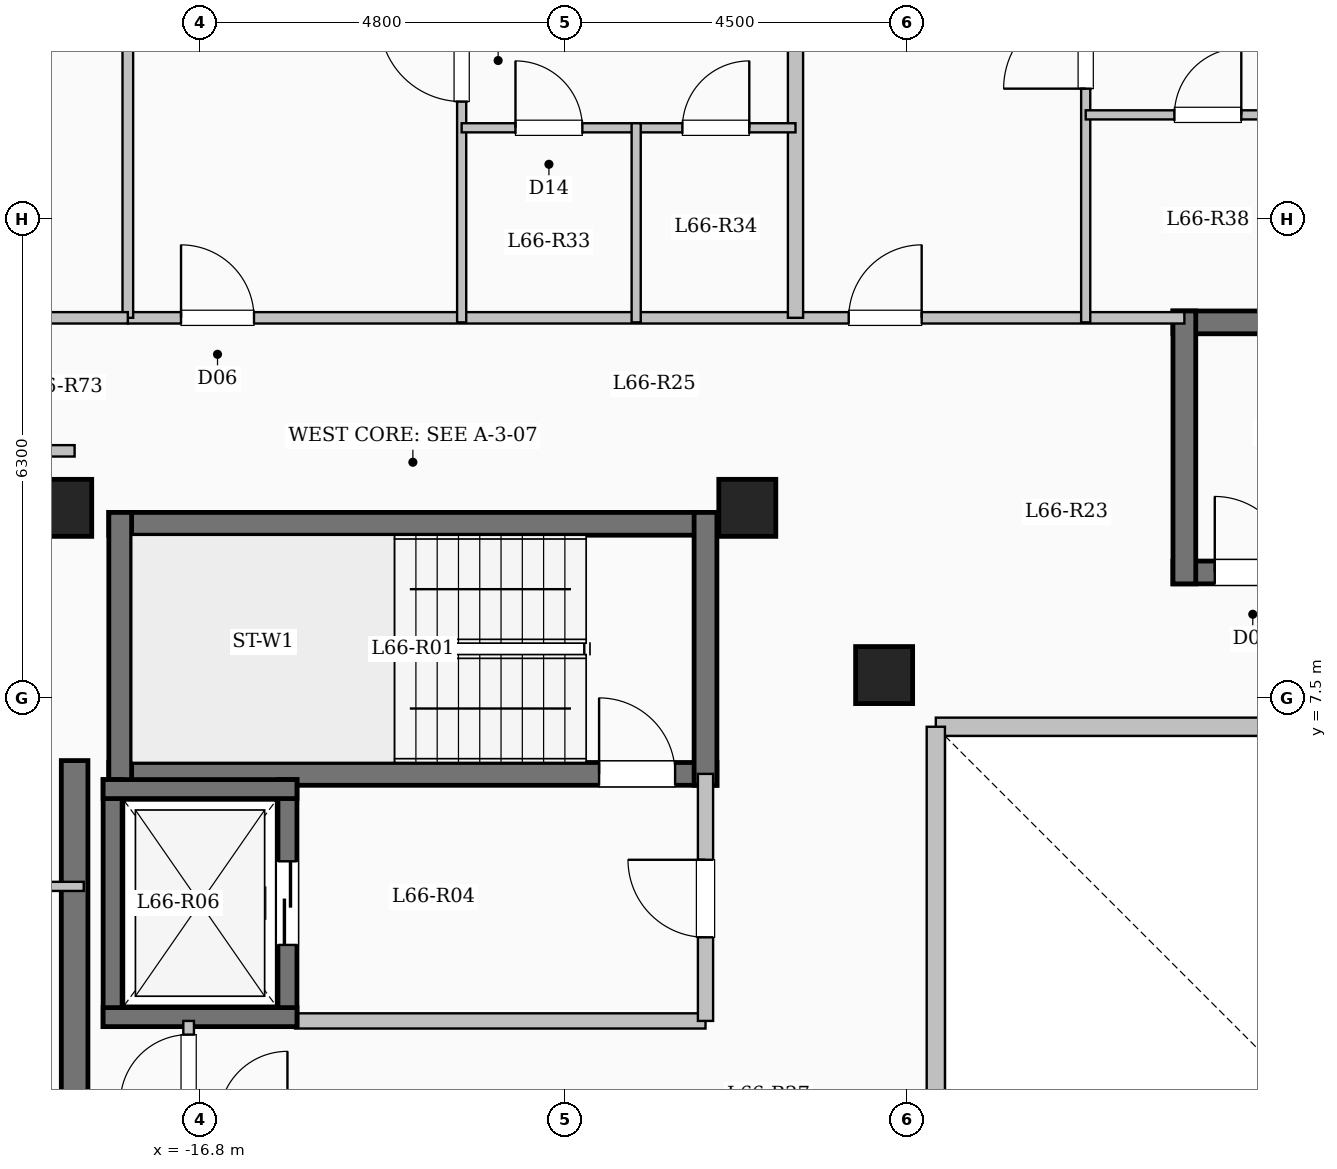
"""IFC4 building model, lengths in metres.
Left out: names, types, materials, properties, quantities, classifications, styles, units other than length and angle.
Written with IfcOpenShell. Run it as: python <this file> out.ifc"""

import sys

from ifc_helpers import new_model, si_unit, direction, frame, frame_2d, origin, origin_2d, place, context, subcontext, project, spatial, rectangle, extrude, element, fill, save


model = new_model("IFC4")
c1 = context("Model", 3, precision=1e-05, world=origin(), true_north=direction((0.0, 1.0)))
c2 = subcontext(c1, "Body", "Model", "MODEL_VIEW")
j1 = project(units=[si_unit("LENGTHUNIT", "METRE"), si_unit("PLANEANGLEUNIT", "RADIAN")], contexts=[c1])
p1 = place(None, origin())
s1 = spatial("IfcSite", under=j1, at=p1, CompositionType="ELEMENT")
p2 = place(p1, origin())
s2 = spatial("IfcBuilding", under=s1, at=p2, CompositionType="ELEMENT")
p3 = place(p2, frame((0.0, 0.0, 244.85)))
s3 = spatial("IfcBuildingStorey", under=s2, at=p3, CompositionType="ELEMENT", Elevation=244.85)
for number, where, z_axis, x_axis in (
    (1, (-7.8, 7.8, 0.0), (0.0, 0.0, 1.0), (1.0, 0.0, 0.0)),
    (2, (-9.6, 10.0, 0.0), (0.0, 0.0, 1.0), (1.0, 0.0, 0.0)),
    (3, (-18.6, 10.0, 0.0), (0.0, 0.0, 1.0), (1.0, 0.0, 0.0)),
):
    element("IfcColumn", number, at=place(p3, frame(where, z_axis=z_axis, x_axis=x_axis)), inside=s3, PredefinedType="COLUMN", context=c2, shape_type="SweptSolid", body=[
        extrude(rectangle(XDim=0.75, YDim=0.75, at=origin_2d()), origin(), (0.0, 0.0, 1.0), 3.35),
    ])
p4 = place(p3, frame((7.12, 7.12, 0.0), z_axis=(0.0, 0.0, 1.0), x_axis=(-1.0, 0.0, 0.0)))
e4 = element("IfcWall", 4, at=p4, inside=s3, PredefinedType="SOLIDWALL", context=c2, shape_type="SweptSolid", body=[
    extrude(rectangle(XDim=14.24, YDim=0.24, at=frame_2d((7.12, 0.0))), origin(), (0.0, 0.0, 1.0), 3.1),
])
p5 = place(p4, frame((6.42, 0.0, 0.95)))
e5 = element("IfcOpeningElement", 5, at=p5, cuts=e4, PredefinedType="OPENING", context=c2, shape_type="SweptSolid", body=[
    extrude(rectangle(XDim=1.4, YDim=1.5, at=frame_2d((0.7, 0.75))), frame((0.0, 0.13, 0.0), z_axis=(0.0, -1.0, 0.0), x_axis=(1.0, 0.0, 0.0)), (0.0, 0.0, 1.0), 0.26),
])
p6 = place(p3, frame((-7.12, 7.12, 0.0), z_axis=(0.0, 0.0, 1.0), x_axis=(0.0, -1.0, 0.0)))
e6 = element("IfcWall", 6, at=p6, inside=s3, PredefinedType="SOLIDWALL", context=c2, shape_type="SweptSolid", body=[
    extrude(rectangle(XDim=14.24, YDim=0.24, at=frame_2d((7.12, 0.0))), origin(), (0.0, 0.0, 1.0), 3.1),
])
p7 = place(p6, frame((6.42, 0.0, 0.95)))
e7 = element("IfcOpeningElement", 7, at=p7, cuts=e6, PredefinedType="OPENING", context=c2, shape_type="SweptSolid", body=[
    extrude(rectangle(XDim=1.4, YDim=1.5, at=frame_2d((0.7, 0.75))), frame((0.0, 0.13, 0.0), z_axis=(0.0, -1.0, 0.0), x_axis=(1.0, 0.0, 0.0)), (0.0, 0.0, 1.0), 0.26),
])
p8 = place(p3, frame((-18.0, 9.79, 0.0), z_axis=(0.0, 0.0, 1.0), x_axis=(1.0, 0.0, 0.0)))
e8 = element("IfcWall", 8, at=p8, inside=s3, PredefinedType="SHEAR", context=c2, shape_type="SweptSolid", body=[
    extrude(rectangle(XDim=8.0, YDim=0.3, at=frame_2d((4.0, 0.0))), origin(), (0.0, 0.0, 1.0), 3.35),
])
p9 = place(p3, frame((-18.0, 6.5, 0.0), z_axis=(0.0, 0.0, 1.0), x_axis=(1.0, 0.0, 0.0)))
e9 = element("IfcWall", 9, at=p9, inside=s3, PredefinedType="SHEAR", context=c2, shape_type="SweptSolid", body=[
    extrude(rectangle(XDim=8.0, YDim=0.3, at=frame_2d((4.0, 0.0))), origin(), (0.0, 0.0, 1.0), 3.35),
])
p10 = place(p9, frame((6.45, 0.0, 0.0)))
e10 = element("IfcOpeningElement", 10, at=p10, cuts=e9, PredefinedType="OPENING", context=c2, shape_type="SweptSolid", body=[
    extrude(rectangle(XDim=1.0, YDim=2.15, at=frame_2d((0.5, 1.075))), frame((0.0, 0.16, 0.0), z_axis=(0.0, -1.0, 0.0), x_axis=(1.0, 0.0, 0.0)), (0.0, 0.0, 1.0), 0.32),
])
for number, where, z_axis, x_axis in (
    (11, (-17.85, 6.35, 0.0), (0.0, 0.0, 1.0), (0.0, 1.0, 0.0)),
    (12, (-10.15, 6.35, 0.0), (0.0, 0.0, 1.0), (0.0, 1.0, 0.0)),
):
    element("IfcWall", number, at=place(p3, frame(where, z_axis=z_axis, x_axis=x_axis)), inside=s3, PredefinedType="SHEAR", context=c2, shape_type="SweptSolid", body=[
        extrude(rectangle(XDim=3.59, YDim=0.3, at=frame_2d((1.795, 0.0))), origin(), (0.0, 0.0, 1.0), 3.35),
    ])
p11 = place(p3, frame((-4.0, 12.44, 0.0), z_axis=(0.0, 0.0, 1.0), x_axis=(1.0, 0.0, 0.0)))
e13 = element("IfcWall", 13, at=p11, inside=s3, PredefinedType="SHEAR", context=c2, shape_type="SweptSolid", body=[
    extrude(rectangle(XDim=8.0, YDim=0.3, at=frame_2d((4.0, 0.0))), origin(), (0.0, 0.0, 1.0), 3.35),
])
p12 = place(p3, frame((-4.0, 9.15, 0.0), z_axis=(0.0, 0.0, 1.0), x_axis=(1.0, 0.0, 0.0)))
e14 = element("IfcWall", 14, at=p12, inside=s3, PredefinedType="SHEAR", context=c2, shape_type="SweptSolid", body=[
    extrude(rectangle(XDim=8.0, YDim=0.3, at=frame_2d((4.0, 0.0))), origin(), (0.0, 0.0, 1.0), 3.35),
])
p13 = place(p12, frame((0.55, 0.0, 0.0)))
e15 = element("IfcOpeningElement", 15, at=p13, cuts=e14, PredefinedType="OPENING", context=c2, shape_type="SweptSolid", body=[
    extrude(rectangle(XDim=1.0, YDim=2.15, at=frame_2d((0.5, 1.075))), frame((0.0, 0.16, 0.0), z_axis=(0.0, -1.0, 0.0), x_axis=(1.0, 0.0, 0.0)), (0.0, 0.0, 1.0), 0.32),
])
p14 = place(p3, frame((-3.85, 9.0, 0.0), z_axis=(0.0, 0.0, 1.0), x_axis=(0.0, 1.0, 0.0)))
e16 = element("IfcWall", 16, at=p14, inside=s3, PredefinedType="SHEAR", context=c2, shape_type="SweptSolid", body=[
    extrude(rectangle(XDim=3.59, YDim=0.3, at=frame_2d((1.795, 0.0))), origin(), (0.0, 0.0, 1.0), 3.35),
])
p15 = place(p3, frame((-15.55, 3.25, 0.0), z_axis=(0.0, 0.0, 1.0), x_axis=(1.0, 0.0, 0.0)))
e17 = element("IfcWall", 17, at=p15, inside=s3, PredefinedType="SOLIDWALL", context=c2, shape_type="SweptSolid", body=[
    extrude(rectangle(XDim=5.4, YDim=0.2, at=frame_2d((2.7, 0.0))), origin(), (0.0, 0.0, 1.0), 3.1),
])
p16 = place(p3, frame((-10.15, 3.25, 0.0), z_axis=(0.0, 0.0, 1.0), x_axis=(0.0, 1.0, 0.0)))
e18 = element("IfcWall", 18, at=p16, inside=s3, PredefinedType="SOLIDWALL", context=c2, shape_type="SweptSolid", body=[
    extrude(rectangle(XDim=3.25, YDim=0.2, at=frame_2d((1.625, 0.0))), origin(), (0.0, 0.0, 1.0), 3.1),
])
p17 = place(p16, frame((1.1, 0.0, 0.0)))
e19 = element("IfcOpeningElement", 19, at=p17, cuts=e18, PredefinedType="OPENING", context=c2, shape_type="SweptSolid", body=[
    extrude(rectangle(XDim=1.02, YDim=2.15, at=frame_2d((0.51, 1.075))), frame((0.0, 0.11, 0.0), z_axis=(0.0, -1.0, 0.0), x_axis=(1.0, 0.0, 0.0)), (0.0, 0.0, 1.0), 0.22),
])
p18 = place(p3, frame((-17.95, 3.175, 0.0), z_axis=(0.0, 0.0, 1.0), x_axis=(0.0, 1.0, 0.0)))
e20 = element("IfcWall", 20, at=p18, inside=s3, PredefinedType="SHEAR", context=c2, shape_type="SweptSolid", body=[
    extrude(rectangle(XDim=3.25, YDim=0.25, at=frame_2d((1.625, 0.0))), origin(), (0.0, 0.0, 1.0), 3.35),
])
p19 = place(p3, frame((-15.65, 3.175, 0.0), z_axis=(0.0, 0.0, 1.0), x_axis=(0.0, 1.0, 0.0)))
e21 = element("IfcWall", 21, at=p19, inside=s3, PredefinedType="SHEAR", context=c2, shape_type="SweptSolid", body=[
    extrude(rectangle(XDim=3.25, YDim=0.25, at=frame_2d((1.625, 0.0))), origin(), (0.0, 0.0, 1.0), 3.35),
])
p20 = place(p19, frame((1.075, 0.0, 0.0)))
e22 = element("IfcOpeningElement", 22, at=p20, cuts=e21, PredefinedType="OPENING", context=c2, shape_type="SweptSolid", body=[
    extrude(rectangle(XDim=1.1, YDim=2.15, at=frame_2d((0.55, 1.075))), frame((0.0, 0.135, 0.0), z_axis=(0.0, -1.0, 0.0), x_axis=(1.0, 0.0, 0.0)), (0.0, 0.0, 1.0), 0.27),
])
for number, where, z_axis, x_axis in (
    (23, (-18.075, 3.3, 0.0), (0.0, 0.0, 1.0), (1.0, 0.0, 0.0)),
    (24, (-18.075, 6.3, 0.0), (0.0, 0.0, 1.0), (1.0, 0.0, 0.0)),
):
    element("IfcWall", number, at=place(p3, frame(where, z_axis=z_axis, x_axis=x_axis)), inside=s3, PredefinedType="SHEAR", context=c2, shape_type="SweptSolid", body=[
        extrude(rectangle(XDim=2.55, YDim=0.25, at=frame_2d((1.275, 0.0))), origin(), (0.0, 0.0, 1.0), 3.35),
    ])
p21 = place(p3, frame((-18.45, -7.375, 0.0), z_axis=(0.0, 0.0, 1.0), x_axis=(0.0, 1.0, 0.0)))
e25 = element("IfcWall", 25, at=p21, inside=s3, PredefinedType="SHEAR", context=c2, shape_type="SweptSolid", body=[
    extrude(rectangle(XDim=14.05, YDim=0.35, at=frame_2d((7.025, 0.0))), origin(), (0.0, 0.0, 1.0), 3.35),
])
p22 = place(p3, frame((-16.95, 1.95, 0.0), z_axis=(0.0, 0.0, 1.0), x_axis=(0.0, 1.0, 0.0)))
e26 = element("IfcWall", 26, at=p22, inside=s3, PredefinedType="PARTITIONING", context=c2, shape_type="SweptSolid", body=[
    extrude(rectangle(XDim=1.3, YDim=0.14, at=frame_2d((0.65, 0.0))), origin(), (0.0, 0.0, 1.0), 3.1),
])
p23 = place(p22, frame((0.22, 0.0, 0.0)))
e27 = element("IfcOpeningElement", 27, at=p23, cuts=e26, PredefinedType="OPENING", context=c2, shape_type="SweptSolid", body=[
    extrude(rectangle(XDim=0.9, YDim=2.08, at=frame_2d((0.45, 1.04))), frame((0.0, 0.08, 0.0), z_axis=(0.0, -1.0, 0.0), x_axis=(1.0, 0.0, 0.0)), (0.0, 0.0, 1.0), 0.16),
])
p24 = place(p3, frame((-17.75, 12.5, 0.0), z_axis=(0.0, 0.0, 1.0), x_axis=(1.0, 0.0, 0.0)))
e28 = element("IfcWall", 28, at=p24, inside=s3, PredefinedType="PARTITIONING", context=c2, shape_type="SweptSolid", body=[
    extrude(rectangle(XDim=13.9, YDim=0.15, at=frame_2d((6.95, 0.0))), origin(), (0.0, 0.0, 1.0), 3.1),
])
p25 = place(p24, frame((0.7, 0.0, 0.0)))
e29 = element("IfcOpeningElement", 29, at=p25, cuts=e28, PredefinedType="OPENING", context=c2, shape_type="SweptSolid", body=[
    extrude(rectangle(XDim=0.96, YDim=2.15, at=frame_2d((0.48, 1.075))), frame((0.0, 0.085, 0.0), z_axis=(0.0, -1.0, 0.0), x_axis=(1.0, 0.0, 0.0)), (0.0, 0.0, 1.0), 0.17),
])
p26 = place(p24, frame((9.484, 0.0, 0.0)))
e30 = element("IfcOpeningElement", 30, at=p26, cuts=e28, PredefinedType="OPENING", context=c2, shape_type="SweptSolid", body=[
    extrude(rectangle(XDim=0.96, YDim=2.15, at=frame_2d((0.48, 1.075))), frame((0.0, 0.085, 0.0), z_axis=(0.0, -1.0, 0.0), x_axis=(1.0, 0.0, 0.0)), (0.0, 0.0, 1.0), 0.17),
])
p27 = place(p3, frame((-8.966, 12.5, 0.0), z_axis=(0.0, 0.0, 1.0), x_axis=(0.0, 1.0, 0.0)))
e31 = element("IfcWall", 31, at=p27, inside=s3, PredefinedType="SOLIDWALL", context=c2, shape_type="SweptSolid", body=[
    extrude(rectangle(XDim=8.902, YDim=0.2, at=frame_2d((4.451, 0.0))), origin(), (0.0, 0.0, 1.0), 3.1),
])
p28 = place(p3, frame((-13.358, 12.44, 0.0), z_axis=(0.0, 0.0, 1.0), x_axis=(0.0, 1.0, 0.0)))
e32 = element("IfcWall", 32, at=p28, inside=s3, PredefinedType="PARTITIONING", context=c2, shape_type="SweptSolid", body=[
    extrude(rectangle(XDim=8.46, YDim=0.12, at=frame_2d((4.23, 0.0))), origin(), (0.0, 0.0, 1.0), 3.1),
])
p29 = place(p28, frame((2.905, 0.0, 0.0)))
e33 = element("IfcOpeningElement", 33, at=p29, cuts=e32, PredefinedType="OPENING", context=c2, shape_type="SweptSolid", body=[
    extrude(rectangle(XDim=1.08, YDim=2.15, at=frame_2d((0.54, 1.075))), frame((0.0, 0.07, 0.0), z_axis=(0.0, -1.0, 0.0), x_axis=(1.0, 0.0, 0.0)), (0.0, 0.0, 1.0), 0.14),
])
p30 = place(p3, frame((-13.358, 15.0, 0.0), z_axis=(0.0, 0.0, 1.0), x_axis=(1.0, 0.0, 0.0)))
e34 = element("IfcWall", 34, at=p30, inside=s3, PredefinedType="PARTITIONING", context=c2, shape_type="SweptSolid", body=[
    extrude(rectangle(XDim=2.296, YDim=0.12, at=frame_2d((1.148, 0.0))), origin(), (0.0, 0.0, 1.0), 3.1),
])
p31 = place(p30, frame((0.708, 0.0, 0.0)))
e35 = element("IfcOpeningElement", 35, at=p31, cuts=e34, PredefinedType="OPENING", context=c2, shape_type="SweptSolid", body=[
    extrude(rectangle(XDim=0.88, YDim=2.1, at=frame_2d((0.44, 1.05))), frame((0.0, 0.07, 0.0), z_axis=(0.0, -1.0, 0.0), x_axis=(1.0, 0.0, 0.0)), (0.0, 0.0, 1.0), 0.14),
])
p32 = place(p3, frame((-11.062, 15.0, 0.0), z_axis=(0.0, 0.0, 1.0), x_axis=(1.0, 0.0, 0.0)))
e36 = element("IfcWall", 36, at=p32, inside=s3, PredefinedType="PARTITIONING", context=c2, shape_type="SweptSolid", body=[
    extrude(rectangle(XDim=2.096, YDim=0.12, at=frame_2d((1.048, 0.0))), origin(), (0.0, 0.0, 1.0), 3.1),
])
p33 = place(p32, frame((0.608, 0.0, 0.0)))
e37 = element("IfcOpeningElement", 37, at=p33, cuts=e36, PredefinedType="OPENING", context=c2, shape_type="SweptSolid", body=[
    extrude(rectangle(XDim=0.88, YDim=2.1, at=frame_2d((0.44, 1.05))), frame((0.0, 0.07, 0.0), z_axis=(0.0, -1.0, 0.0), x_axis=(1.0, 0.0, 0.0)), (0.0, 0.0, 1.0), 0.14),
])
p34 = place(p3, frame((-11.062, 12.44, 0.0), z_axis=(0.0, 0.0, 1.0), x_axis=(0.0, 1.0, 0.0)))
e38 = element("IfcWall", 38, at=p34, inside=s3, PredefinedType="PARTITIONING", context=c2, shape_type="SweptSolid", body=[
    extrude(rectangle(XDim=2.62, YDim=0.12, at=frame_2d((1.31, 0.0))), origin(), (0.0, 0.0, 1.0), 3.1),
])
p35 = place(p3, frame((-5.148, 12.44, 0.0), z_axis=(0.0, 0.0, 1.0), x_axis=(0.0, 1.0, 0.0)))
e39 = element("IfcWall", 39, at=p35, inside=s3, PredefinedType="PARTITIONING", context=c2, shape_type="SweptSolid", body=[
    extrude(rectangle(XDim=9.903, YDim=0.12, at=frame_2d((4.952, 0.0))), origin(), (0.0, 0.0, 1.0), 3.1),
])
p36 = place(p35, frame((3.075, 0.0, 0.0)))
e40 = element("IfcOpeningElement", 40, at=p36, cuts=e39, PredefinedType="OPENING", context=c2, shape_type="SweptSolid", body=[
    extrude(rectangle(XDim=1.08, YDim=2.15, at=frame_2d((0.54, 1.075))), frame((0.0, 0.07, 0.0), z_axis=(0.0, -1.0, 0.0), x_axis=(1.0, 0.0, 0.0)), (0.0, 0.0, 1.0), 0.14),
])
p37 = place(p3, frame((-5.148, 15.17, 0.0), z_axis=(0.0, 0.0, 1.0), x_axis=(1.0, 0.0, 0.0)))
e41 = element("IfcWall", 41, at=p37, inside=s3, PredefinedType="PARTITIONING", context=c2, shape_type="SweptSolid", body=[
    extrude(rectangle(XDim=3.214, YDim=0.12, at=frame_2d((1.607, 0.0))), origin(), (0.0, 0.0, 1.0), 3.1),
])
p38 = place(p37, frame((1.167, 0.0, 0.0)))
e42 = element("IfcOpeningElement", 42, at=p38, cuts=e41, PredefinedType="OPENING", context=c2, shape_type="SweptSolid", body=[
    extrude(rectangle(XDim=0.88, YDim=2.1, at=frame_2d((0.44, 1.05))), frame((0.0, 0.07, 0.0), z_axis=(0.0, -1.0, 0.0), x_axis=(1.0, 0.0, 0.0)), (0.0, 0.0, 1.0), 0.14),
])
p39 = place(p3, frame((-22.68, 10.75, 0.0), z_axis=(0.0, 0.0, 1.0), x_axis=(1.0, 0.0, 0.0)))
e43 = element("IfcWall", 43, at=p39, inside=s3, PredefinedType="PARTITIONING", context=c2, shape_type="SweptSolid", body=[
    extrude(rectangle(XDim=4.23, YDim=0.15, at=frame_2d((2.115, 0.0))), origin(), (0.0, 0.0, 1.0), 3.1),
])
p40 = place(p3, frame((-17.75, 12.5, 0.0), z_axis=(0.0, 0.0, 1.0), x_axis=(0.0, 1.0, 0.0)))
e44 = element("IfcWall", 44, at=p40, inside=s3, PredefinedType="PARTITIONING", context=c2, shape_type="SweptSolid", body=[
    extrude(rectangle(XDim=5.05, YDim=0.14, at=frame_2d((2.525, 0.0))), origin(), (0.0, 0.0, 1.0), 3.1),
])
p41 = place(p3, frame((-22.68, 12.5, 0.0), z_axis=(0.0, 0.0, 1.0), x_axis=(1.0, 0.0, 0.0)))
e45 = element("IfcWall", 45, at=p41, inside=s3, PredefinedType="PARTITIONING", context=c2, shape_type="SweptSolid", body=[
    extrude(rectangle(XDim=4.93, YDim=0.15, at=frame_2d((2.465, 0.0))), origin(), (0.0, 0.0, 1.0), 3.1),
])
p42 = place(p41, frame((1.99, 0.0, 0.0)))
e46 = element("IfcOpeningElement", 46, at=p42, cuts=e45, PredefinedType="OPENING", context=c2, shape_type="SweptSolid", body=[
    extrude(rectangle(XDim=0.95, YDim=2.15, at=frame_2d((0.475, 1.075))), frame((0.0, 0.085, 0.0), z_axis=(0.0, -1.0, 0.0), x_axis=(1.0, 0.0, 0.0)), (0.0, 0.0, 1.0), 0.17),
])
p43 = place(p3, frame((-22.8, 5.02, 0.0), z_axis=(0.0, 0.0, 1.0), x_axis=(1.0, 0.0, 0.0)))
e47 = element("IfcWall", 47, at=p43, inside=s3, PredefinedType="PARTITIONING", context=c2, shape_type="SweptSolid", body=[
    extrude(rectangle(XDim=4.47, YDim=0.12, at=frame_2d((2.235, 0.0))), origin(), (0.0, 0.0, 1.0), 3.1),
])
p44 = place(p43, frame((2.9, 0.0, 0.0)))
e48 = element("IfcOpeningElement", 48, at=p44, cuts=e47, PredefinedType="OPENING", context=c2, shape_type="SweptSolid", body=[
    extrude(rectangle(XDim=0.88, YDim=2.1, at=frame_2d((0.44, 1.05))), frame((0.0, 0.07, 0.0), z_axis=(0.0, -1.0, 0.0), x_axis=(1.0, 0.0, 0.0)), (0.0, 0.0, 1.0), 0.14),
])
p45 = place(p10, origin())
e49 = element("IfcDoor", 49, at=p45, inside=s3, OperationType="SINGLE_SWING_LEFT", PredefinedType="DOOR", context=c2, shape_type="SweptSolid", body=[
    extrude(rectangle(XDim=1.0, YDim=2.15, at=frame_2d((0.5, 1.075))), frame((0.0, 0.025, 0.0), z_axis=(0.0, -1.0, 0.0), x_axis=(1.0, 0.0, 0.0)), (0.0, 0.0, 1.0), 0.05),
])
fill(e10, e49)
p46 = place(p13, origin())
e50 = element("IfcDoor", 50, at=p46, inside=s3, OperationType="SINGLE_SWING_LEFT", PredefinedType="DOOR", context=c2, shape_type="SweptSolid", body=[
    extrude(rectangle(XDim=1.0, YDim=2.15, at=frame_2d((0.5, 1.075))), frame((0.0, 0.025, 0.0), z_axis=(0.0, -1.0, 0.0), x_axis=(1.0, 0.0, 0.0)), (0.0, 0.0, 1.0), 0.05),
])
fill(e15, e50)
p47 = place(p17, origin())
e51 = element("IfcDoor", 51, at=p47, inside=s3, OperationType="SINGLE_SWING_RIGHT", PredefinedType="DOOR", context=c2, shape_type="SweptSolid", body=[
    extrude(rectangle(XDim=1.02, YDim=2.15, at=frame_2d((0.51, 1.075))), frame((0.0, 0.025, 0.0), z_axis=(0.0, -1.0, 0.0), x_axis=(1.0, 0.0, 0.0)), (0.0, 0.0, 1.0), 0.05),
])
fill(e19, e51)
p48 = place(p20, origin())
e52 = element("IfcDoor", 52, at=p48, inside=s3, OperationType="SLIDING_TO_LEFT", PredefinedType="DOOR", context=c2, shape_type="SweptSolid", body=[
    extrude(rectangle(XDim=1.1, YDim=2.15, at=frame_2d((0.55, 1.075))), frame((0.0, 0.025, 0.0), z_axis=(0.0, -1.0, 0.0), x_axis=(1.0, 0.0, 0.0)), (0.0, 0.0, 1.0), 0.05),
])
fill(e22, e52)
p49 = place(p23, origin())
e53 = element("IfcDoor", 53, at=p49, inside=s3, OperationType="SINGLE_SWING_LEFT", PredefinedType="DOOR", context=c2, shape_type="SweptSolid", body=[
    extrude(rectangle(XDim=0.9, YDim=2.08, at=frame_2d((0.45, 1.04))), frame((0.0, 0.025, 0.0), z_axis=(0.0, -1.0, 0.0), x_axis=(1.0, 0.0, 0.0)), (0.0, 0.0, 1.0), 0.05),
])
fill(e27, e53)
p50 = place(p25, origin())
e54 = element("IfcDoor", 54, at=p50, inside=s3, OperationType="SINGLE_SWING_LEFT", PredefinedType="DOOR", context=c2, shape_type="SweptSolid", body=[
    extrude(rectangle(XDim=0.96, YDim=2.15, at=frame_2d((0.48, 1.075))), frame((0.0, 0.025, 0.0), z_axis=(0.0, -1.0, 0.0), x_axis=(1.0, 0.0, 0.0)), (0.0, 0.0, 1.0), 0.05),
])
fill(e29, e54)
p51 = place(p29, origin())
e55 = element("IfcDoor", 55, at=p51, inside=s3, OperationType="SINGLE_SWING_RIGHT", PredefinedType="DOOR", context=c2, shape_type="SweptSolid", body=[
    extrude(rectangle(XDim=1.08, YDim=2.15, at=frame_2d((0.54, 1.075))), frame((0.0, 0.025, 0.0), z_axis=(0.0, -1.0, 0.0), x_axis=(1.0, 0.0, 0.0)), (0.0, 0.0, 1.0), 0.05),
])
fill(e33, e55)
p52 = place(p31, origin())
e56 = element("IfcDoor", 56, at=p52, inside=s3, OperationType="SINGLE_SWING_LEFT", PredefinedType="DOOR", context=c2, shape_type="SweptSolid", body=[
    extrude(rectangle(XDim=0.88, YDim=2.1, at=frame_2d((0.44, 1.05))), frame((0.0, 0.025, 0.0), z_axis=(0.0, -1.0, 0.0), x_axis=(1.0, 0.0, 0.0)), (0.0, 0.0, 1.0), 0.05),
])
fill(e35, e56)
p53 = place(p33, origin())
e57 = element("IfcDoor", 57, at=p53, inside=s3, OperationType="SINGLE_SWING_RIGHT", PredefinedType="DOOR", context=c2, shape_type="SweptSolid", body=[
    extrude(rectangle(XDim=0.88, YDim=2.1, at=frame_2d((0.44, 1.05))), frame((0.0, 0.025, 0.0), z_axis=(0.0, -1.0, 0.0), x_axis=(1.0, 0.0, 0.0)), (0.0, 0.0, 1.0), 0.05),
])
fill(e37, e57)
p54 = place(p26, origin())
e58 = element("IfcDoor", 58, at=p54, inside=s3, OperationType="SINGLE_SWING_RIGHT", PredefinedType="DOOR", context=c2, shape_type="SweptSolid", body=[
    extrude(rectangle(XDim=0.96, YDim=2.15, at=frame_2d((0.48, 1.075))), frame((0.0, 0.025, 0.0), z_axis=(0.0, -1.0, 0.0), x_axis=(1.0, 0.0, 0.0)), (0.0, 0.0, 1.0), 0.05),
])
fill(e30, e58)
p55 = place(p36, origin())
e59 = element("IfcDoor", 59, at=p55, inside=s3, OperationType="SINGLE_SWING_LEFT", PredefinedType="DOOR", context=c2, shape_type="SweptSolid", body=[
    extrude(rectangle(XDim=1.08, YDim=2.15, at=frame_2d((0.54, 1.075))), frame((0.0, 0.025, 0.0), z_axis=(0.0, -1.0, 0.0), x_axis=(1.0, 0.0, 0.0)), (0.0, 0.0, 1.0), 0.05),
])
fill(e40, e59)
p56 = place(p38, origin())
e60 = element("IfcDoor", 60, at=p56, inside=s3, OperationType="SINGLE_SWING_RIGHT", PredefinedType="DOOR", context=c2, shape_type="SweptSolid", body=[
    extrude(rectangle(XDim=0.88, YDim=2.1, at=frame_2d((0.44, 1.05))), frame((0.0, 0.025, 0.0), z_axis=(0.0, -1.0, 0.0), x_axis=(1.0, 0.0, 0.0)), (0.0, 0.0, 1.0), 0.05),
])
fill(e42, e60)
save(model, sys.argv[1])
